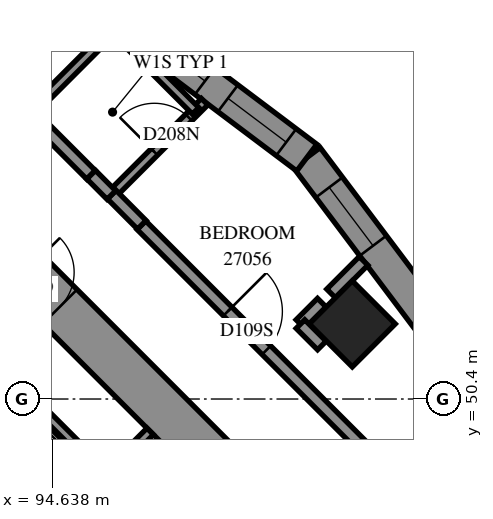
"""IFC4 building model, lengths in metres.
Left out: names, types, materials, properties, quantities, classifications, styles, units other than length and angle.
Written with IfcOpenShell. Run it as: python <this file> out.ifc"""

import sys

from ifc_helpers import new_model, si_unit, direction, frame, frame_2d, origin, origin_2d, place, context, subcontext, project, spatial, polyline, rectangle, outline, extrude, element, fill, save


model = new_model("IFC4")
c1 = context("Model", 3, precision=1e-05, world=origin(), true_north=direction((0.0, 1.0)))
c2 = subcontext(c1, "Body", "Model", "MODEL_VIEW")
j1 = project(units=[si_unit("LENGTHUNIT", "METRE"), si_unit("PLANEANGLEUNIT", "RADIAN")], contexts=[c1])
p1 = place(None, origin())
s1 = spatial("IfcSite", under=j1, at=p1, CompositionType="ELEMENT")
p2 = place(p1, origin())
s2 = spatial("IfcBuilding", under=s1, at=p2, CompositionType="ELEMENT")
p3 = place(p2, frame((0.0, 0.0, 101.6)))
s3 = spatial("IfcBuildingStorey", under=s2, at=p3, CompositionType="ELEMENT", Elevation=101.6)
for number, where, z_axis, x_axis in (
    (1, (94.474, 56.727, 0.0), (0.0, 0.0, 1.0), (0.707, -0.707, 0.0)),
    (2, (99.565, 51.635, 0.0), (0.0, 0.0, 1.0), (0.707, -0.707, 0.0)),
):
    element("IfcColumn", number, at=place(p3, frame(where, z_axis=z_axis, x_axis=x_axis)), inside=s3, PredefinedType="COLUMN", context=c2, shape_type="SweptSolid", body=[
        extrude(rectangle(XDim=1.0, YDim=1.0, at=origin_2d()), origin(), (0.0, 0.0, 1.0), 3.1),
    ])
p4 = place(p3, frame((86.554, 60.121, -0.3), z_axis=(0.0, 0.0, 1.0), x_axis=(0.7071067812, -0.7071067812, 0.0)))
e3 = element("IfcWall", 3, at=p4, inside=s3, PredefinedType="SHEAR", context=c2, shape_type="SweptSolid", body=[
    extrude(rectangle(XDim=16.0, YDim=0.8, at=frame_2d((8.0, 0.0))), origin(), (0.0, 0.0, 1.0), 2.7),
])
p5 = place(p4, frame((10.8, 0.0, 0.3)))
e4 = element("IfcOpeningElement", 4, at=p5, cuts=e3, PredefinedType="OPENING", context=c2, shape_type="SweptSolid", body=[
    extrude(rectangle(XDim=0.8, YDim=2.1, at=frame_2d((0.4, 1.05))), frame((0.0, 0.41, 0.0), z_axis=(0.0, -1.0, 0.0), x_axis=(1.0, 0.0, 0.0)), (0.0, 0.0, 1.0), 0.82),
])
p6 = place(p3, frame((100.887, 51.617, 0.0), z_axis=(0.0, 0.0, 1.0), x_axis=(-0.6011839411, 0.7991106738, 0.0)))
e5 = element("IfcWall", 5, at=p6, inside=s3, PredefinedType="SOLIDWALL", context=c2, shape_type="SweptSolid", body=[
    extrude(outline(polyline([(0.039, -0.275), (3.483, -0.275), (3.405, 0.275), (-0.039, 0.275), (0.039, -0.275)])), origin(), (0.0, 0.0, 1.0), 3.1),
])
p7 = place(p6, frame((1.631, 0.0, 0.5)))
e6 = element("IfcOpeningElement", 6, at=p7, cuts=e5, PredefinedType="OPENING", context=c2, shape_type="SweptSolid", body=[
    extrude(rectangle(XDim=1.2, YDim=2.45, at=frame_2d((0.6, 1.225))), frame((0.0, 0.285, 0.0), z_axis=(0.0, -1.0, 0.0), x_axis=(1.0, 0.0, 0.0)), (0.0, 0.0, 1.0), 0.57),
])
p8 = place(p3, frame((98.817, 54.369, 0.0), z_axis=(0.0, 0.0, 1.0), x_axis=(-0.7990967254, 0.6012024813, 0.0)))
e7 = element("IfcWall", 7, at=p8, inside=s3, PredefinedType="SOLIDWALL", context=c2, shape_type="SweptSolid", body=[
    extrude(outline(polyline([(-0.039, -0.275), (3.405, -0.275), (3.483, 0.275), (0.039, 0.275), (-0.039, -0.275)])), origin(), (0.0, 0.0, 1.0), 3.1),
])
p9 = place(p8, frame((0.423, 0.0, 0.5)))
e8 = element("IfcOpeningElement", 8, at=p9, cuts=e7, PredefinedType="OPENING", context=c2, shape_type="SweptSolid", body=[
    extrude(rectangle(XDim=1.2, YDim=2.45, at=frame_2d((0.6, 1.225))), frame((0.0, 0.285, 0.0), z_axis=(0.0, -1.0, 0.0), x_axis=(1.0, 0.0, 0.0)), (0.0, 0.0, 1.0), 0.57),
])
p10 = place(p8, frame((2.095, 0.0, 0.45)))
e9 = element("IfcOpeningElement", 9, at=p10, cuts=e7, PredefinedType="OPENING", context=c2, shape_type="SweptSolid", body=[
    extrude(rectangle(XDim=1.0, YDim=2.5, at=frame_2d((0.5, 1.25))), frame((0.0, 0.285, 0.0), z_axis=(0.0, -1.0, 0.0), x_axis=(1.0, 0.0, 0.0)), (0.0, 0.0, 1.0), 0.57),
])
p11 = place(p3, frame((91.313, 53.354, 0.0), z_axis=(0.0, 0.0, 1.0), x_axis=(0.7071067812, -0.7071067812, 0.0)))
e10 = element("IfcWall", 10, at=p11, inside=s3, PredefinedType="PARTITIONING", context=c2, shape_type="SweptSolid", body=[
    extrude(rectangle(XDim=5.95, YDim=0.15, at=frame_2d((2.975, 0.0))), origin(), (0.0, 0.0, 1.0), 3.1),
])
p12 = place(p3, frame((95.52, 49.146, 0.0), z_axis=(0.0, 0.0, 1.0), x_axis=(0.7071067812, 0.7071067812, 0.0)))
e11 = element("IfcWall", 11, at=p12, inside=s3, PredefinedType="PARTITIONING", context=c2, shape_type="SweptSolid", body=[
    extrude(rectangle(XDim=1.02, YDim=0.15, at=frame_2d((0.51, 0.0))), origin(), (0.0, 0.0, 1.0), 3.1),
])
p13 = place(p3, frame((94.331, 41.313, 0.0), z_axis=(0.0, 0.0, 1.0), x_axis=(0.7071109413, 0.7071026211, 0.0)))
e12 = element("IfcWall", 12, at=p13, inside=s3, PredefinedType="PARTITIONING", context=c2, shape_type="SweptSolid", body=[
    extrude(rectangle(XDim=12.019, YDim=0.2, at=frame_2d((6.01, 0.0))), origin(), (0.0, 0.0, 1.0), 3.1),
])
p14 = place(p3, frame((87.894, 61.461, 0.0), z_axis=(0.0, 0.0, 1.0), x_axis=(0.7071067812, -0.7071067812, 0.0)))
e13 = element("IfcWall", 13, at=p14, inside=s3, PredefinedType="PARTITIONING", context=c2, shape_type="SweptSolid", body=[
    extrude(rectangle(XDim=10.428, YDim=0.2, at=frame_2d((5.214, 0.0))), origin(), (0.0, 0.0, 1.0), 3.1),
])
p15 = place(p14, frame((6.39, 0.0, 0.0)))
e14 = element("IfcOpeningElement", 14, at=p15, cuts=e13, PredefinedType="OPENING", context=c2, shape_type="SweptSolid", body=[
    extrude(rectangle(XDim=0.9, YDim=2.1, at=frame_2d((0.45, 1.05))), frame((0.0, 0.11, 0.0), z_axis=(0.0, -1.0, 0.0), x_axis=(1.0, 0.0, 0.0)), (0.0, 0.0, 1.0), 0.22),
])
p16 = place(p3, frame((96.097, 53.258, 0.0), z_axis=(0.0, 0.0, 1.0), x_axis=(0.7071067812, -0.7071067812, 0.0)))
e15 = element("IfcWall", 15, at=p16, inside=s3, PredefinedType="PARTITIONING", context=c2, shape_type="SweptSolid", body=[
    extrude(rectangle(XDim=5.9, YDim=0.2, at=frame_2d((2.95, 0.0))), origin(), (0.0, 0.0, 1.0), 3.1),
])
p17 = place(p16, frame((2.006, 0.0, 0.0)))
e16 = element("IfcOpeningElement", 16, at=p17, cuts=e15, PredefinedType="OPENING", context=c2, shape_type="SweptSolid", body=[
    extrude(rectangle(XDim=0.9, YDim=2.1, at=frame_2d((0.45, 1.05))), frame((0.0, 0.11, 0.0), z_axis=(0.0, -1.0, 0.0), x_axis=(1.0, 0.0, 0.0)), (0.0, 0.0, 1.0), 0.22),
])
p18 = place(p3, frame((95.605, 53.759, 0.0), z_axis=(0.0, 0.0, 1.0), x_axis=(0.7071067812, 0.7071067812, 0.0)))
e17 = element("IfcWall", 17, at=p18, inside=s3, PredefinedType="PARTITIONING", context=c2, shape_type="SweptSolid", body=[
    extrude(rectangle(XDim=2.165, YDim=0.15, at=frame_2d((1.082, 0.0))), origin(), (0.0, 0.0, 1.0), 3.1),
])
p19 = place(p18, frame((0.997, 0.0, 0.0)))
e18 = element("IfcOpeningElement", 18, at=p19, cuts=e17, PredefinedType="OPENING", context=c2, shape_type="SweptSolid", body=[
    extrude(rectangle(XDim=0.8, YDim=2.1, at=frame_2d((0.4, 1.05))), frame((0.0, 0.085, 0.0), z_axis=(0.0, -1.0, 0.0), x_axis=(1.0, 0.0, 0.0)), (0.0, 0.0, 1.0), 0.17),
])
p20 = place(p3, frame((94.261, 55.101, 0.0), z_axis=(0.0, 0.0, 1.0), x_axis=(0.7065791742, 0.7076339948, 0.0)))
e19 = element("IfcWall", 19, at=p20, inside=s3, PredefinedType="PARTITIONING", context=c2, shape_type="SweptSolid", body=[
    extrude(rectangle(XDim=1.991, YDim=0.15, at=frame_2d((0.995, 0.0))), origin(), (0.0, 0.0, 1.0), 3.1),
])
p21 = place(p3, frame((95.966, 56.161, 0.0), z_axis=(0.0, 0.0, 1.0), x_axis=(0.7071413797, -0.707072181, 0.0)))
e20 = element("IfcWall", 20, at=p21, inside=s3, PredefinedType="PARTITIONING", context=c2, shape_type="SweptSolid", body=[
    extrude(rectangle(XDim=1.445, YDim=0.15, at=frame_2d((0.723, 0.0))), origin(), (0.0, 0.0, 1.0), 3.1),
])
p22 = place(p3, frame((99.216, 52.136, 0.0), z_axis=(0.0, 0.0, 1.0), x_axis=(0.7071067812, 0.7071067812, 0.0)))
e21 = element("IfcWall", 21, at=p22, inside=s3, PredefinedType="PARTITIONING", context=c2, shape_type="SweptSolid", body=[
    extrude(rectangle(XDim=0.756, YDim=0.2, at=frame_2d((0.378, 0.0))), origin(), (0.0, 0.0, 1.0), 3.1),
])
p23 = place(p3, frame((95.609, 53.761, 0.0), z_axis=(0.0, 0.0, 1.0), x_axis=(0.7056768426, -0.7085338339, 0.0)))
e22 = element("IfcWall", 22, at=p23, inside=s3, PredefinedType="PARTITIONING", context=c2, shape_type="SweptSolid", body=[
    extrude(rectangle(XDim=0.7, YDim=0.2, at=frame_2d((0.35, 0.0))), origin(), (0.0, 0.0, 1.0), 3.1),
])
for number, where, z_axis, x_axis in (
    (23, (98.712, 51.632, 0.0), (0.0, 0.0, 1.0), (0.707, 0.707, 0.0)),
    (24, (98.713, 51.633, 0.0), (0.0, 0.0, 1.0), (0.707, -0.707, 0.0)),
):
    element("IfcWall", number, at=place(p3, frame(where, z_axis=z_axis, x_axis=x_axis)), inside=s3, PredefinedType="PARTITIONING", context=c2, shape_type="SweptSolid", body=[
        extrude(rectangle(XDim=0.498, YDim=0.2, at=frame_2d((0.249, 0.0))), origin(), (0.0, 0.0, 1.0), 3.1),
    ])
p24 = place(p3, frame((95.271, 54.089, 0.0), z_axis=(0.0, 0.0, 1.0), x_axis=(0.7049801586, -0.7092270271, 0.0)))
e25 = element("IfcWall", 25, at=p24, inside=s3, PredefinedType="PARTITIONING", context=c2, shape_type="SweptSolid", body=[
    extrude(rectangle(XDim=0.471, YDim=0.2, at=frame_2d((0.235, 0.0))), origin(), (0.0, 0.0, 1.0), 3.1),
])
p25 = place(p7, origin())
e26 = element("IfcWindow", 26, at=p25, inside=s3, PartitioningType="SINGLE_PANEL", PredefinedType="WINDOW", context=c2, shape_type="SweptSolid", body=[
    extrude(rectangle(XDim=1.2, YDim=2.45, at=frame_2d((0.6, 1.225))), frame((0.0, 0.155, 0.0), z_axis=(0.0, -1.0, 0.0), x_axis=(1.0, 0.0, 0.0)), (0.0, 0.0, 1.0), 0.06),
])
fill(e6, e26)
p26 = place(p17, origin())
e27 = element("IfcDoor", 27, at=p26, inside=s3, OperationType="SINGLE_SWING_LEFT", PredefinedType="DOOR", context=c2, shape_type="SweptSolid", body=[
    extrude(rectangle(XDim=0.9, YDim=2.1, at=frame_2d((0.45, 1.05))), frame((0.0, 0.025, 0.0), z_axis=(0.0, -1.0, 0.0), x_axis=(1.0, 0.0, 0.0)), (0.0, 0.0, 1.0), 0.05),
])
fill(e16, e27)
p27 = place(p19, origin())
e28 = element("IfcDoor", 28, at=p27, inside=s3, OperationType="SINGLE_SWING_RIGHT", PredefinedType="DOOR", context=c2, shape_type="SweptSolid", body=[
    extrude(rectangle(XDim=0.8, YDim=2.1, at=frame_2d((0.4, 1.05))), frame((0.0, 0.025, 0.0), z_axis=(0.0, -1.0, 0.0), x_axis=(1.0, 0.0, 0.0)), (0.0, 0.0, 1.0), 0.05),
])
fill(e18, e28)
p28 = place(p9, origin())
e29 = element("IfcWindow", 29, at=p28, inside=s3, PartitioningType="SINGLE_PANEL", PredefinedType="WINDOW", context=c2, shape_type="SweptSolid", body=[
    extrude(rectangle(XDim=1.2, YDim=2.45, at=frame_2d((0.6, 1.225))), frame((0.0, 0.155, 0.0), z_axis=(0.0, -1.0, 0.0), x_axis=(1.0, 0.0, 0.0)), (0.0, 0.0, 1.0), 0.06),
])
fill(e8, e29)
p29 = place(p10, origin())
e30 = element("IfcWindow", 30, at=p29, inside=s3, PartitioningType="SINGLE_PANEL", PredefinedType="WINDOW", context=c2, shape_type="SweptSolid", body=[
    extrude(rectangle(XDim=1.0, YDim=2.5, at=frame_2d((0.5, 1.25))), frame((0.0, 0.155, 0.0), z_axis=(0.0, -1.0, 0.0), x_axis=(1.0, 0.0, 0.0)), (0.0, 0.0, 1.0), 0.06),
])
fill(e9, e30)
save(model, sys.argv[1])
